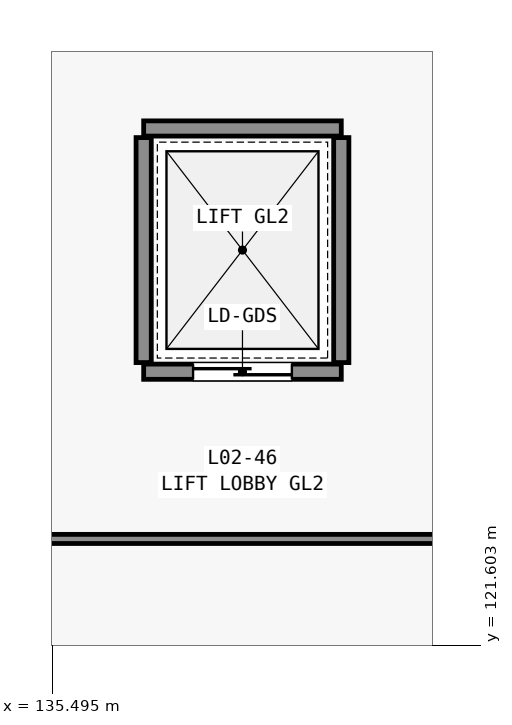
"""IFC4 building model, lengths in metres.
Left out: names, types, materials, properties, quantities, classifications, styles, units other than length and angle.
Written with IfcOpenShell. Run it as: python <this file> out.ifc"""

import sys

from ifc_helpers import new_model, si_unit, direction, frame, frame_2d, origin, place, context, subcontext, project, spatial, rectangle, extrude, element, fill, save


model = new_model("IFC4")
c1 = context("Model", 3, precision=1e-05, world=origin(), true_north=direction((0.0, 1.0)))
c2 = subcontext(c1, "Body", "Model", "MODEL_VIEW")
j1 = project(units=[si_unit("LENGTHUNIT", "METRE"), si_unit("PLANEANGLEUNIT", "RADIAN")], contexts=[c1])
p1 = place(None, origin())
s1 = spatial("IfcSite", under=j1, at=p1, CompositionType="ELEMENT")
p2 = place(p1, origin())
s2 = spatial("IfcBuilding", under=s1, at=p2, CompositionType="ELEMENT")
p3 = place(p2, frame((0.0, 0.0, 11.4)))
s3 = spatial("IfcBuildingStorey", under=s2, at=p3, CompositionType="ELEMENT", Elevation=11.4)
p4 = place(p3, frame((136.7, 125.2, 0.0), z_axis=(0.0, 0.0, 1.0), x_axis=(1.0, 0.0, 0.0)))
e1 = element("IfcWall", 1, at=p4, inside=s3, PredefinedType="STANDARD", context=c2, shape_type="SweptSolid", body=[
    extrude(rectangle(XDim=2.6, YDim=0.2, at=frame_2d((1.3, 0.0))), origin(), (0.0, 0.0, 1.0), 4.45),
])
p5 = place(p4, frame((0.65, 0.0, 0.0)))
e2 = element("IfcOpeningElement", 2, at=p5, cuts=e1, PredefinedType="OPENING", context=c2, shape_type="SweptSolid", body=[
    extrude(rectangle(XDim=1.3, YDim=2.15, at=frame_2d((0.65, 1.075))), frame((0.0, 0.11, 0.0), z_axis=(0.0, -1.0, 0.0), x_axis=(1.0, 0.0, 0.0)), (0.0, 0.0, 1.0), 0.22),
])
p6 = place(p3, frame((136.7, 128.4, 0.0), z_axis=(0.0, 0.0, 1.0), x_axis=(1.0, 0.0, 0.0)))
e3 = element("IfcWall", 3, at=p6, inside=s3, PredefinedType="STANDARD", context=c2, shape_type="SweptSolid", body=[
    extrude(rectangle(XDim=2.6, YDim=0.2, at=frame_2d((1.3, 0.0))), origin(), (0.0, 0.0, 1.0), 4.45),
])
for number, where, z_axis, x_axis in (
    (4, (136.7, 125.32, 0.0), (0.0, 0.0, 1.0), (0.0, 1.0, 0.0)),
    (5, (139.3, 125.32, 0.0), (0.0, 0.0, 1.0), (0.0, 1.0, 0.0)),
):
    element("IfcWall", number, at=place(p3, frame(where, z_axis=z_axis, x_axis=x_axis)), inside=s3, PredefinedType="STANDARD", context=c2, shape_type="SweptSolid", body=[
        extrude(rectangle(XDim=2.96, YDim=0.2, at=frame_2d((1.48, 0.0))), origin(), (0.0, 0.0, 1.0), 4.45),
    ])
p7 = place(p3, frame((113.5, 123.0, 0.0), z_axis=(0.0, 0.0, 1.0), x_axis=(1.0, 0.0, 0.0)))
e6 = element("IfcWall", 6, at=p7, inside=s3, PredefinedType="PARTITIONING", context=c2, shape_type="SweptSolid", body=[
    extrude(rectangle(XDim=30.5, YDim=0.12, at=frame_2d((15.25, 0.0))), origin(), (0.0, 0.0, 1.0), 3.838),
])
p8 = place(p5, origin())
e7 = element("IfcDoor", 7, at=p8, inside=s3, OperationType="SLIDING_TO_LEFT", PredefinedType="DOOR", context=c2, shape_type="SweptSolid", body=[
    extrude(rectangle(XDim=1.3, YDim=2.15, at=frame_2d((0.65, 1.075))), frame((0.0, 0.025, 0.0), z_axis=(0.0, -1.0, 0.0), x_axis=(1.0, 0.0, 0.0)), (0.0, 0.0, 1.0), 0.05),
])
fill(e2, e7)
save(model, sys.argv[1])
